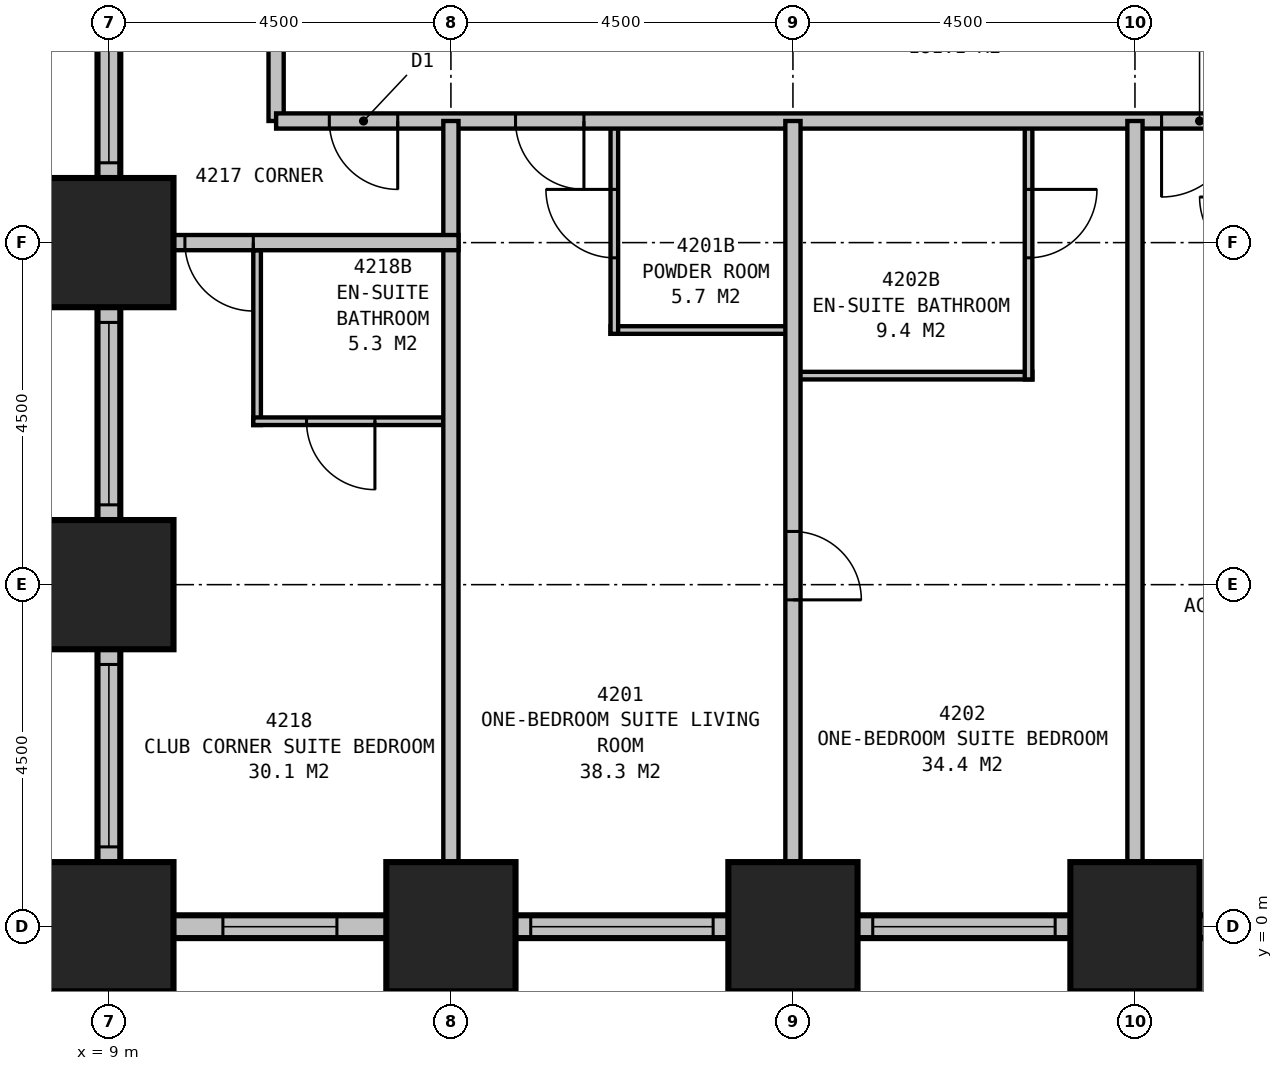
"""IFC4 building model, lengths in metres.
Left out: names, types, materials, properties, quantities, classifications, styles, units other than length and angle.
Written with IfcOpenShell. Run it as: python <this file> out.ifc"""

import sys

from ifc_helpers import new_model, si_unit, direction, frame, frame_2d, origin, origin_2d, place, context, subcontext, project, spatial, rectangle, extrude, element, fill, save


model = new_model("IFC4")
c1 = context("Model", 3, precision=1e-05, world=origin(), true_north=direction((0.0, 1.0)))
c2 = subcontext(c1, "Body", "Model", "MODEL_VIEW")
j1 = project(units=[si_unit("LENGTHUNIT", "METRE"), si_unit("PLANEANGLEUNIT", "RADIAN")], contexts=[c1])
p1 = place(None, origin())
s1 = spatial("IfcSite", under=j1, at=p1, CompositionType="ELEMENT")
p2 = place(p1, origin())
s2 = spatial("IfcBuilding", under=s1, at=p2, CompositionType="ELEMENT")
p3 = place(p2, frame((0.0, 0.0, 165.9)))
s3 = spatial("IfcBuildingStorey", under=s2, at=p3, CompositionType="ELEMENT", Elevation=165.9)
for number, where, z_axis, x_axis in (
    (1, (9.0, 9.0, 0.0), (0.0, 0.0, 1.0), (1.0, 0.0, 0.0)),
    (2, (9.0, 4.5, 0.0), (0.0, 0.0, 1.0), (1.0, 0.0, 0.0)),
    (3, (9.0, 0.0, 0.0), (0.0, 0.0, 1.0), (1.0, 0.0, 0.0)),
    (4, (13.5, 0.0, 0.0), (0.0, 0.0, 1.0), (1.0, 0.0, 0.0)),
    (5, (18.0, 0.0, 0.0), (0.0, 0.0, 1.0), (1.0, 0.0, 0.0)),
    (6, (22.5, 0.0, 0.0), (0.0, 0.0, 1.0), (1.0, 0.0, 0.0)),
):
    element("IfcColumn", number, at=place(p3, frame(where, z_axis=z_axis, x_axis=x_axis)), inside=s3, PredefinedType="COLUMN", context=c2, shape_type="SweptSolid", body=[
        extrude(rectangle(XDim=1.7, YDim=1.7, at=origin_2d()), origin(), (0.0, 0.0, 1.0), 3.5),
    ])
p4 = place(p3, frame((9.0, 13.65, 0.0), z_axis=(0.0, 0.0, 1.0), x_axis=(0.0, -1.0, 0.0)))
e7 = element("IfcWall", 7, at=p4, inside=s3, PredefinedType="STANDARD", context=c2, shape_type="SweptSolid", body=[
    extrude(rectangle(XDim=13.8, YDim=0.3, at=frame_2d((6.9, 0.0))), origin(), (0.0, 0.0, 1.0), 2.15),
])
p5 = place(p4, frame((1.2, 0.0, 0.5)))
e8 = element("IfcOpeningElement", 8, at=p5, cuts=e7, PredefinedType="OPENING", context=c2, shape_type="SweptSolid", body=[
    extrude(rectangle(XDim=2.4, YDim=1.5, at=frame_2d((1.2, 0.75))), frame((0.0, 0.16, 0.0), z_axis=(0.0, -1.0, 0.0), x_axis=(1.0, 0.0, 0.0)), (0.0, 0.0, 1.0), 0.32),
])
p6 = place(p4, frame((5.7, 0.0, 0.5)))
e9 = element("IfcOpeningElement", 9, at=p6, cuts=e7, PredefinedType="OPENING", context=c2, shape_type="SweptSolid", body=[
    extrude(rectangle(XDim=2.4, YDim=1.5, at=frame_2d((1.2, 0.75))), frame((0.0, 0.16, 0.0), z_axis=(0.0, -1.0, 0.0), x_axis=(1.0, 0.0, 0.0)), (0.0, 0.0, 1.0), 0.32),
])
p7 = place(p4, frame((10.2, 0.0, 0.5)))
e10 = element("IfcOpeningElement", 10, at=p7, cuts=e7, PredefinedType="OPENING", context=c2, shape_type="SweptSolid", body=[
    extrude(rectangle(XDim=2.4, YDim=1.5, at=frame_2d((1.2, 0.75))), frame((0.0, 0.16, 0.0), z_axis=(0.0, -1.0, 0.0), x_axis=(1.0, 0.0, 0.0)), (0.0, 0.0, 1.0), 0.32),
])
p8 = place(p3, frame((8.85, 0.0, 0.0), z_axis=(0.0, 0.0, 1.0), x_axis=(1.0, 0.0, 0.0)))
e11 = element("IfcWall", 11, at=p8, inside=s3, PredefinedType="STANDARD", context=c2, shape_type="SweptSolid", body=[
    extrude(rectangle(XDim=36.3, YDim=0.3, at=frame_2d((18.15, 0.0))), origin(), (0.0, 0.0, 1.0), 2.25),
])
p9 = place(p8, frame((1.65, 0.0, 0.5)))
e12 = element("IfcOpeningElement", 12, at=p9, cuts=e11, PredefinedType="OPENING", context=c2, shape_type="SweptSolid", body=[
    extrude(rectangle(XDim=1.5, YDim=1.6, at=frame_2d((0.75, 0.8))), frame((0.0, 0.16, 0.0), z_axis=(0.0, -1.0, 0.0), x_axis=(1.0, 0.0, 0.0)), (0.0, 0.0, 1.0), 0.32),
])
p10 = place(p8, frame((5.7, 0.0, 0.5)))
e13 = element("IfcOpeningElement", 13, at=p10, cuts=e11, PredefinedType="OPENING", context=c2, shape_type="SweptSolid", body=[
    extrude(rectangle(XDim=2.4, YDim=1.6, at=frame_2d((1.2, 0.8))), frame((0.0, 0.16, 0.0), z_axis=(0.0, -1.0, 0.0), x_axis=(1.0, 0.0, 0.0)), (0.0, 0.0, 1.0), 0.32),
])
p11 = place(p8, frame((10.2, 0.0, 0.5)))
e14 = element("IfcOpeningElement", 14, at=p11, cuts=e11, PredefinedType="OPENING", context=c2, shape_type="SweptSolid", body=[
    extrude(rectangle(XDim=2.4, YDim=1.6, at=frame_2d((1.2, 0.8))), frame((0.0, 0.16, 0.0), z_axis=(0.0, -1.0, 0.0), x_axis=(1.0, 0.0, 0.0)), (0.0, 0.0, 1.0), 0.32),
])
p12 = place(p8, frame((14.7, 0.0, 0.5)))
e15 = element("IfcOpeningElement", 15, at=p12, cuts=e11, PredefinedType="OPENING", context=c2, shape_type="SweptSolid", body=[
    extrude(rectangle(XDim=2.4, YDim=1.6, at=frame_2d((1.2, 0.8))), frame((0.0, 0.16, 0.0), z_axis=(0.0, -1.0, 0.0), x_axis=(1.0, 0.0, 0.0)), (0.0, 0.0, 1.0), 0.32),
])
p13 = place(p8, frame((19.2, 0.0, 0.5)))
e16 = element("IfcOpeningElement", 16, at=p13, cuts=e11, PredefinedType="OPENING", context=c2, shape_type="SweptSolid", body=[
    extrude(rectangle(XDim=2.4, YDim=1.6, at=frame_2d((1.2, 0.8))), frame((0.0, 0.16, 0.0), z_axis=(0.0, -1.0, 0.0), x_axis=(1.0, 0.0, 0.0)), (0.0, 0.0, 1.0), 0.32),
])
p14 = place(p8, frame((23.7, 0.0, 0.5)))
e17 = element("IfcOpeningElement", 17, at=p14, cuts=e11, PredefinedType="OPENING", context=c2, shape_type="SweptSolid", body=[
    extrude(rectangle(XDim=2.4, YDim=1.6, at=frame_2d((1.2, 0.8))), frame((0.0, 0.16, 0.0), z_axis=(0.0, -1.0, 0.0), x_axis=(1.0, 0.0, 0.0)), (0.0, 0.0, 1.0), 0.32),
])
p15 = place(p8, frame((28.2, 0.0, 0.5)))
e18 = element("IfcOpeningElement", 18, at=p15, cuts=e11, PredefinedType="OPENING", context=c2, shape_type="SweptSolid", body=[
    extrude(rectangle(XDim=2.4, YDim=1.6, at=frame_2d((1.2, 0.8))), frame((0.0, 0.16, 0.0), z_axis=(0.0, -1.0, 0.0), x_axis=(1.0, 0.0, 0.0)), (0.0, 0.0, 1.0), 0.32),
])
p16 = place(p8, frame((32.7, 0.0, 0.5)))
e19 = element("IfcOpeningElement", 19, at=p16, cuts=e11, PredefinedType="OPENING", context=c2, shape_type="SweptSolid", body=[
    extrude(rectangle(XDim=2.4, YDim=1.6, at=frame_2d((1.2, 0.8))), frame((0.0, 0.16, 0.0), z_axis=(0.0, -1.0, 0.0), x_axis=(1.0, 0.0, 0.0)), (0.0, 0.0, 1.0), 0.32),
])
p17 = place(p3, frame((11.2, 10.6, 0.0), z_axis=(0.0, 0.0, 1.0), x_axis=(1.0, 0.0, 0.0)))
e20 = element("IfcWall", 20, at=p17, inside=s3, PredefinedType="PARTITIONING", context=c2, shape_type="SweptSolid", body=[
    extrude(rectangle(XDim=27.1, YDim=0.2, at=frame_2d((13.55, 0.0))), origin(), (0.0, 0.0, 1.0), 3.25),
])
p18 = place(p17, frame((4.05, 0.0, 0.0), z_axis=(0.0, 0.0, 1.0), x_axis=(-1.0, 0.0, 0.0)))
e21 = element("IfcOpeningElement", 21, at=p18, cuts=e20, PredefinedType="OPENING", context=c2, shape_type="SweptSolid", body=[
    extrude(rectangle(XDim=0.9, YDim=2.1, at=frame_2d((0.45, 1.05))), frame((0.0, 0.11, 0.0), z_axis=(0.0, -1.0, 0.0), x_axis=(1.0, 0.0, 0.0)), (0.0, 0.0, 1.0), 0.22),
])
p19 = place(p17, frame((12.65, 0.0, 0.0), z_axis=(0.0, 0.0, 1.0), x_axis=(-1.0, 0.0, 0.0)))
e22 = element("IfcOpeningElement", 22, at=p19, cuts=e20, PredefinedType="OPENING", context=c2, shape_type="SweptSolid", body=[
    extrude(rectangle(XDim=1.0, YDim=2.1, at=frame_2d((0.5, 1.05))), frame((0.0, 0.11, 0.0), z_axis=(0.0, -1.0, 0.0), x_axis=(1.0, 0.0, 0.0)), (0.0, 0.0, 1.0), 0.22),
])
p20 = place(p17, frame((17.55, 0.0, 0.0), z_axis=(0.0, 0.0, 1.0), x_axis=(-1.0, 0.0, 0.0)))
e23 = element("IfcOpeningElement", 23, at=p20, cuts=e20, PredefinedType="OPENING", context=c2, shape_type="SweptSolid", body=[
    extrude(rectangle(XDim=0.9, YDim=2.1, at=frame_2d((0.45, 1.05))), frame((0.0, 0.11, 0.0), z_axis=(0.0, -1.0, 0.0), x_axis=(1.0, 0.0, 0.0)), (0.0, 0.0, 1.0), 0.22),
])
p21 = place(p17, frame((1.6, 0.0, 0.0), z_axis=(0.0, 0.0, 1.0), x_axis=(-1.0, 0.0, 0.0)))
e24 = element("IfcOpeningElement", 24, at=p21, cuts=e20, PredefinedType="OPENING", context=c2, shape_type="SweptSolid", body=[
    extrude(rectangle(XDim=0.9, YDim=2.1, at=frame_2d((0.45, 1.05))), frame((0.0, 0.11, 0.0), z_axis=(0.0, -1.0, 0.0), x_axis=(1.0, 0.0, 0.0)), (0.0, 0.0, 1.0), 0.22),
])
p22 = place(p17, frame((26.4, 0.0, 0.0), z_axis=(0.0, 0.0, 1.0), x_axis=(-1.0, 0.0, 0.0)))
e25 = element("IfcOpeningElement", 25, at=p22, cuts=e20, PredefinedType="OPENING", context=c2, shape_type="SweptSolid", body=[
    extrude(rectangle(XDim=0.9, YDim=2.1, at=frame_2d((0.45, 1.05))), frame((0.0, 0.11, 0.0), z_axis=(0.0, -1.0, 0.0), x_axis=(1.0, 0.0, 0.0)), (0.0, 0.0, 1.0), 0.22),
])
p23 = place(p3, frame((11.2, 10.6, 0.0), z_axis=(0.0, 0.0, 1.0), x_axis=(0.0, 1.0, 0.0)))
e26 = element("IfcWall", 26, at=p23, inside=s3, PredefinedType="PARTITIONING", context=c2, shape_type="SweptSolid", body=[
    extrude(rectangle(XDim=18.7, YDim=0.2, at=frame_2d((9.35, 0.0))), origin(), (0.0, 0.0, 1.0), 3.25),
])
p24 = place(p23, frame((6.05, 0.0, 0.0)))
e27 = element("IfcOpeningElement", 27, at=p24, cuts=e26, PredefinedType="OPENING", context=c2, shape_type="SweptSolid", body=[
    extrude(rectangle(XDim=0.9, YDim=2.1, at=frame_2d((0.45, 1.05))), frame((0.0, 0.11, 0.0), z_axis=(0.0, -1.0, 0.0), x_axis=(1.0, 0.0, 0.0)), (0.0, 0.0, 1.0), 0.22),
])
p25 = place(p23, frame((10.55, 0.0, 0.0)))
e28 = element("IfcOpeningElement", 28, at=p25, cuts=e26, PredefinedType="OPENING", context=c2, shape_type="SweptSolid", body=[
    extrude(rectangle(XDim=0.9, YDim=2.1, at=frame_2d((0.45, 1.05))), frame((0.0, 0.11, 0.0), z_axis=(0.0, -1.0, 0.0), x_axis=(1.0, 0.0, 0.0)), (0.0, 0.0, 1.0), 0.22),
])
p26 = place(p23, frame((14.65, 0.0, 0.0)))
e29 = element("IfcOpeningElement", 29, at=p26, cuts=e26, PredefinedType="OPENING", context=c2, shape_type="SweptSolid", body=[
    extrude(rectangle(XDim=1.0, YDim=2.1, at=frame_2d((0.5, 1.05))), frame((0.0, 0.11, 0.0), z_axis=(0.0, -1.0, 0.0), x_axis=(1.0, 0.0, 0.0)), (0.0, 0.0, 1.0), 0.22),
])
p27 = place(p3, frame((18.0, 10.6, 0.0), z_axis=(0.0, 0.0, 1.0), x_axis=(0.0, -1.0, 0.0)))
e30 = element("IfcWall", 30, at=p27, inside=s3, PredefinedType="PARTITIONING", context=c2, shape_type="SweptSolid", body=[
    extrude(rectangle(XDim=10.6, YDim=0.2, at=frame_2d((5.3, 0.0))), origin(), (0.0, 0.0, 1.0), 2.25),
])
p28 = place(p27, frame((5.4, 0.0, 0.0)))
e31 = element("IfcOpeningElement", 31, at=p28, cuts=e30, PredefinedType="OPENING", context=c2, shape_type="SweptSolid", body=[
    extrude(rectangle(XDim=0.9, YDim=2.1, at=frame_2d((0.45, 1.05))), frame((0.0, 0.11, 0.0), z_axis=(0.0, -1.0, 0.0), x_axis=(1.0, 0.0, 0.0)), (0.0, 0.0, 1.0), 0.22),
])
p29 = place(p3, frame((22.5, 10.6, 0.0), z_axis=(0.0, 0.0, 1.0), x_axis=(0.0, -1.0, 0.0)))
e32 = element("IfcWall", 32, at=p29, inside=s3, PredefinedType="PARTITIONING", context=c2, shape_type="SweptSolid", body=[
    extrude(rectangle(XDim=10.6, YDim=0.2, at=frame_2d((5.3, 0.0))), origin(), (0.0, 0.0, 1.0), 2.25),
])
p30 = place(p3, frame((15.6, 7.85, 0.0), z_axis=(0.0, 0.0, 1.0), x_axis=(1.0, 0.0, 0.0)))
e33 = element("IfcWall", 33, at=p30, inside=s3, PredefinedType="PLUMBINGWALL", context=c2, shape_type="SweptSolid", body=[
    extrude(rectangle(XDim=2.4, YDim=0.1, at=frame_2d((1.2, 0.0))), origin(), (0.0, 0.0, 1.0), 3.25),
])
p31 = place(p3, frame((15.65, 10.6, 0.0), z_axis=(0.0, 0.0, 1.0), x_axis=(0.0, -1.0, 0.0)))
e34 = element("IfcWall", 34, at=p31, inside=s3, PredefinedType="PLUMBINGWALL", context=c2, shape_type="SweptSolid", body=[
    extrude(rectangle(XDim=2.8, YDim=0.1, at=frame_2d((1.4, 0.0))), origin(), (0.0, 0.0, 1.0), 3.25),
])
p32 = place(p31, frame((1.8, 0.0, 0.0), z_axis=(0.0, 0.0, 1.0), x_axis=(-1.0, 0.0, 0.0)))
e35 = element("IfcOpeningElement", 35, at=p32, cuts=e34, PredefinedType="OPENING", context=c2, shape_type="SweptSolid", body=[
    extrude(rectangle(XDim=0.9, YDim=2.1, at=frame_2d((0.45, 1.05))), frame((0.0, 0.06, 0.0), z_axis=(0.0, -1.0, 0.0), x_axis=(1.0, 0.0, 0.0)), (0.0, 0.0, 1.0), 0.12),
])
p33 = place(p3, frame((18.0, 7.25, 0.0), z_axis=(0.0, 0.0, 1.0), x_axis=(1.0, 0.0, 0.0)))
e36 = element("IfcWall", 36, at=p33, inside=s3, PredefinedType="PLUMBINGWALL", context=c2, shape_type="SweptSolid", body=[
    extrude(rectangle(XDim=3.15, YDim=0.1, at=frame_2d((1.575, 0.0))), origin(), (0.0, 0.0, 1.0), 3.25),
])
p34 = place(p3, frame((21.1, 10.6, 0.0), z_axis=(0.0, 0.0, 1.0), x_axis=(0.0, -1.0, 0.0)))
e37 = element("IfcWall", 37, at=p34, inside=s3, PredefinedType="PLUMBINGWALL", context=c2, shape_type="SweptSolid", body=[
    extrude(rectangle(XDim=3.4, YDim=0.1, at=frame_2d((1.7, 0.0))), origin(), (0.0, 0.0, 1.0), 3.25),
])
p35 = place(p34, frame((0.9, 0.0, 0.0)))
e38 = element("IfcOpeningElement", 38, at=p35, cuts=e37, PredefinedType="OPENING", context=c2, shape_type="SweptSolid", body=[
    extrude(rectangle(XDim=0.9, YDim=2.1, at=frame_2d((0.45, 1.05))), frame((0.0, 0.06, 0.0), z_axis=(0.0, -1.0, 0.0), x_axis=(1.0, 0.0, 0.0)), (0.0, 0.0, 1.0), 0.12),
])
p36 = place(p3, frame((13.5, 10.6, 0.0), z_axis=(0.0, 0.0, 1.0), x_axis=(0.0, -1.0, 0.0)))
e39 = element("IfcWall", 39, at=p36, inside=s3, PredefinedType="PARTITIONING", context=c2, shape_type="SweptSolid", body=[
    extrude(rectangle(XDim=10.6, YDim=0.2, at=frame_2d((5.3, 0.0))), origin(), (0.0, 0.0, 1.0), 2.25),
])
p37 = place(p3, frame((13.6, 9.0, 0.0), z_axis=(0.0, 0.0, 1.0), x_axis=(-1.0, 0.0, 0.0)))
e40 = element("IfcWall", 40, at=p37, inside=s3, PredefinedType="PARTITIONING", context=c2, shape_type="SweptSolid", body=[
    extrude(rectangle(XDim=4.6, YDim=0.2, at=frame_2d((2.3, 0.0))), origin(), (0.0, 0.0, 1.0), 3.25),
])
p38 = place(p37, frame((2.7, 0.0, 0.0)))
e41 = element("IfcOpeningElement", 41, at=p38, cuts=e40, PredefinedType="OPENING", context=c2, shape_type="SweptSolid", body=[
    extrude(rectangle(XDim=0.9, YDim=2.1, at=frame_2d((0.45, 1.05))), frame((0.0, 0.11, 0.0), z_axis=(0.0, -1.0, 0.0), x_axis=(1.0, 0.0, 0.0)), (0.0, 0.0, 1.0), 0.22),
])
p39 = place(p3, frame((10.95, 8.9, 0.0), z_axis=(0.0, 0.0, 1.0), x_axis=(0.0, -1.0, 0.0)))
e42 = element("IfcWall", 42, at=p39, inside=s3, PredefinedType="PLUMBINGWALL", context=c2, shape_type="SweptSolid", body=[
    extrude(rectangle(XDim=2.3, YDim=0.1, at=frame_2d((1.15, 0.0))), origin(), (0.0, 0.0, 1.0), 3.25),
])
p40 = place(p3, frame((13.4, 6.65, 0.0), z_axis=(0.0, 0.0, 1.0), x_axis=(-1.0, 0.0, 0.0)))
e43 = element("IfcWall", 43, at=p40, inside=s3, PredefinedType="PLUMBINGWALL", context=c2, shape_type="SweptSolid", body=[
    extrude(rectangle(XDim=2.5, YDim=0.1, at=frame_2d((1.25, 0.0))), origin(), (0.0, 0.0, 1.0), 3.25),
])
p41 = place(p40, frame((0.9, 0.0, 0.0)))
e44 = element("IfcOpeningElement", 44, at=p41, cuts=e43, PredefinedType="OPENING", context=c2, shape_type="SweptSolid", body=[
    extrude(rectangle(XDim=0.9, YDim=2.1, at=frame_2d((0.45, 1.05))), frame((0.0, 0.06, 0.0), z_axis=(0.0, -1.0, 0.0), x_axis=(1.0, 0.0, 0.0)), (0.0, 0.0, 1.0), 0.12),
])
p42 = place(p5, origin())
e45 = element("IfcWindow", 45, at=p42, inside=s3, PartitioningType="SINGLE_PANEL", PredefinedType="WINDOW", context=c2, shape_type="SweptSolid", body=[
    extrude(rectangle(XDim=2.4, YDim=1.5, at=frame_2d((1.2, 0.75))), frame((0.0, 0.03, 0.0), z_axis=(0.0, -1.0, 0.0), x_axis=(1.0, 0.0, 0.0)), (0.0, 0.0, 1.0), 0.06),
])
fill(e8, e45)
p43 = place(p6, origin())
e46 = element("IfcWindow", 46, at=p43, inside=s3, PartitioningType="SINGLE_PANEL", PredefinedType="WINDOW", context=c2, shape_type="SweptSolid", body=[
    extrude(rectangle(XDim=2.4, YDim=1.5, at=frame_2d((1.2, 0.75))), frame((0.0, 0.03, 0.0), z_axis=(0.0, -1.0, 0.0), x_axis=(1.0, 0.0, 0.0)), (0.0, 0.0, 1.0), 0.06),
])
fill(e9, e46)
p44 = place(p7, origin())
e47 = element("IfcWindow", 47, at=p44, inside=s3, PartitioningType="SINGLE_PANEL", PredefinedType="WINDOW", context=c2, shape_type="SweptSolid", body=[
    extrude(rectangle(XDim=2.4, YDim=1.5, at=frame_2d((1.2, 0.75))), frame((0.0, 0.03, 0.0), z_axis=(0.0, -1.0, 0.0), x_axis=(1.0, 0.0, 0.0)), (0.0, 0.0, 1.0), 0.06),
])
fill(e10, e47)
p45 = place(p9, origin())
e48 = element("IfcWindow", 48, at=p45, inside=s3, PartitioningType="SINGLE_PANEL", PredefinedType="WINDOW", context=c2, shape_type="SweptSolid", body=[
    extrude(rectangle(XDim=1.5, YDim=1.6, at=frame_2d((0.75, 0.8))), frame((0.0, 0.03, 0.0), z_axis=(0.0, -1.0, 0.0), x_axis=(1.0, 0.0, 0.0)), (0.0, 0.0, 1.0), 0.06),
])
fill(e12, e48)
p46 = place(p10, origin())
e49 = element("IfcWindow", 49, at=p46, inside=s3, PartitioningType="SINGLE_PANEL", PredefinedType="WINDOW", context=c2, shape_type="SweptSolid", body=[
    extrude(rectangle(XDim=2.4, YDim=1.6, at=frame_2d((1.2, 0.8))), frame((0.0, 0.03, 0.0), z_axis=(0.0, -1.0, 0.0), x_axis=(1.0, 0.0, 0.0)), (0.0, 0.0, 1.0), 0.06),
])
fill(e13, e49)
p47 = place(p11, origin())
e50 = element("IfcWindow", 50, at=p47, inside=s3, PartitioningType="SINGLE_PANEL", PredefinedType="WINDOW", context=c2, shape_type="SweptSolid", body=[
    extrude(rectangle(XDim=2.4, YDim=1.6, at=frame_2d((1.2, 0.8))), frame((0.0, 0.03, 0.0), z_axis=(0.0, -1.0, 0.0), x_axis=(1.0, 0.0, 0.0)), (0.0, 0.0, 1.0), 0.06),
])
fill(e14, e50)
p48 = place(p18, origin())
e51 = element("IfcDoor", 51, at=p48, inside=s3, OperationType="SINGLE_SWING_LEFT", PredefinedType="DOOR", context=c2, shape_type="SweptSolid", body=[
    extrude(rectangle(XDim=0.9, YDim=2.1, at=frame_2d((0.45, 1.05))), frame((0.0, 0.025, 0.0), z_axis=(0.0, -1.0, 0.0), x_axis=(1.0, 0.0, 0.0)), (0.0, 0.0, 1.0), 0.05),
])
fill(e21, e51)
p49 = place(p19, origin())
e52 = element("IfcDoor", 52, at=p49, inside=s3, OperationType="SINGLE_SWING_RIGHT", PredefinedType="DOOR", context=c2, shape_type="SweptSolid", body=[
    extrude(rectangle(XDim=1.0, YDim=2.1, at=frame_2d((0.5, 1.05))), frame((0.0, 0.025, 0.0), z_axis=(0.0, -1.0, 0.0), x_axis=(1.0, 0.0, 0.0)), (0.0, 0.0, 1.0), 0.05),
])
fill(e22, e52)
p50 = place(p21, origin())
e53 = element("IfcDoor", 53, at=p50, inside=s3, OperationType="SINGLE_SWING_LEFT", PredefinedType="DOOR", context=c2, shape_type="SweptSolid", body=[
    extrude(rectangle(XDim=0.9, YDim=2.1, at=frame_2d((0.45, 1.05))), frame((0.0, 0.025, 0.0), z_axis=(0.0, -1.0, 0.0), x_axis=(1.0, 0.0, 0.0)), (0.0, 0.0, 1.0), 0.05),
])
fill(e24, e53)
p51 = place(p28, origin())
e54 = element("IfcDoor", 54, at=p51, inside=s3, OperationType="SINGLE_SWING_RIGHT", PredefinedType="DOOR", context=c2, shape_type="SweptSolid", body=[
    extrude(rectangle(XDim=0.9, YDim=2.1, at=frame_2d((0.45, 1.05))), frame((0.0, 0.025, 0.0), z_axis=(0.0, -1.0, 0.0), x_axis=(1.0, 0.0, 0.0)), (0.0, 0.0, 1.0), 0.05),
])
fill(e31, e54)
p52 = place(p32, origin())
e55 = element("IfcDoor", 55, at=p52, inside=s3, OperationType="SINGLE_SWING_RIGHT", PredefinedType="DOOR", context=c2, shape_type="SweptSolid", body=[
    extrude(rectangle(XDim=0.9, YDim=2.1, at=frame_2d((0.45, 1.05))), frame((0.0, 0.025, 0.0), z_axis=(0.0, -1.0, 0.0), x_axis=(1.0, 0.0, 0.0)), (0.0, 0.0, 1.0), 0.05),
])
fill(e35, e55)
p53 = place(p35, origin())
e56 = element("IfcDoor", 56, at=p53, inside=s3, OperationType="SINGLE_SWING_LEFT", PredefinedType="DOOR", context=c2, shape_type="SweptSolid", body=[
    extrude(rectangle(XDim=0.9, YDim=2.1, at=frame_2d((0.45, 1.05))), frame((0.0, 0.025, 0.0), z_axis=(0.0, -1.0, 0.0), x_axis=(1.0, 0.0, 0.0)), (0.0, 0.0, 1.0), 0.05),
])
fill(e38, e56)
p54 = place(p38, origin())
e57 = element("IfcDoor", 57, at=p54, inside=s3, OperationType="SINGLE_SWING_LEFT", PredefinedType="DOOR", context=c2, shape_type="SweptSolid", body=[
    extrude(rectangle(XDim=0.9, YDim=2.1, at=frame_2d((0.45, 1.05))), frame((0.0, 0.025, 0.0), z_axis=(0.0, -1.0, 0.0), x_axis=(1.0, 0.0, 0.0)), (0.0, 0.0, 1.0), 0.05),
])
fill(e41, e57)
p55 = place(p41, origin())
e58 = element("IfcDoor", 58, at=p55, inside=s3, OperationType="SINGLE_SWING_LEFT", PredefinedType="DOOR", context=c2, shape_type="SweptSolid", body=[
    extrude(rectangle(XDim=0.9, YDim=2.1, at=frame_2d((0.45, 1.05))), frame((0.0, 0.025, 0.0), z_axis=(0.0, -1.0, 0.0), x_axis=(1.0, 0.0, 0.0)), (0.0, 0.0, 1.0), 0.05),
])
fill(e44, e58)
save(model, sys.argv[1])
